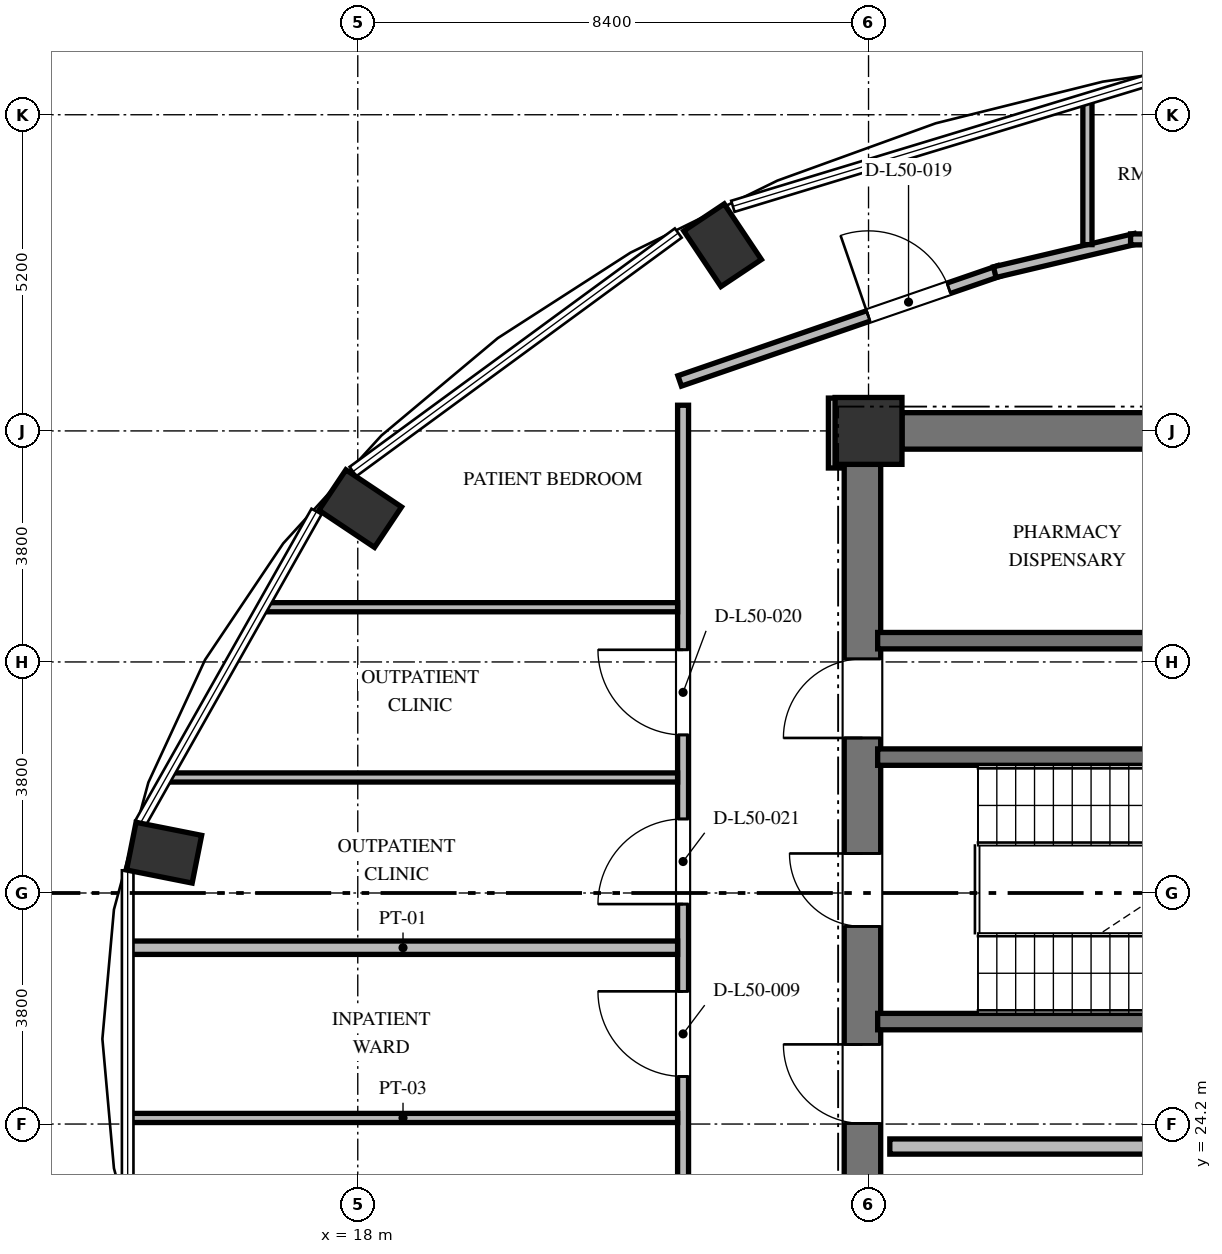
"""IFC4 building model, lengths in metres.
Left out: names, types, materials, properties, quantities, classifications, styles, units other than length and angle.
Written with IfcOpenShell. Run it as: python <this file> out.ifc"""

import sys

from ifc_helpers import new_model, si_unit, direction, frame, frame_2d, origin, origin_2d, place, context, subcontext, project, spatial, rectangle, extrude, element, fill, save


model = new_model("IFC4")
c1 = context("Model", 3, precision=1e-05, world=origin(), true_north=direction((0.0, 1.0)))
c2 = subcontext(c1, "Body", "Model", "MODEL_VIEW")
j1 = project(units=[si_unit("LENGTHUNIT", "METRE"), si_unit("PLANEANGLEUNIT", "RADIAN")], contexts=[c1])
p1 = place(None, origin())
s1 = spatial("IfcSite", under=j1, at=p1, CompositionType="ELEMENT")
p2 = place(p1, origin())
s2 = spatial("IfcBuilding", under=s1, at=p2, CompositionType="ELEMENT")
p3 = place(p2, frame((0.0, 0.0, 194.832)))
s3 = spatial("IfcBuildingStorey", under=s2, at=p3, CompositionType="ELEMENT", Elevation=194.832)
for number, where, z_axis, x_axis in (
    (1, (24.0, 38.654, 0.0), (0.0, 0.0, 1.0), (-0.556, 0.831, 0.0)),
    (2, (18.04, 34.323, 0.0), (0.0, 0.0, 1.0), (-0.831, 0.556, 0.0)),
    (3, (14.815, 28.663, 0.0), (0.0, 0.0, 1.0), (-0.981, 0.195, 0.0)),
):
    element("IfcColumn", number, at=place(p3, frame(where, z_axis=z_axis, x_axis=x_axis)), inside=s3, PredefinedType="COLUMN", context=c2, shape_type="SweptSolid", body=[
        extrude(rectangle(XDim=1.1, YDim=0.8, at=origin_2d()), origin(), (0.0, 0.0, 1.0), 3.648),
    ])
p4 = place(p3, frame((26.4, 35.6, 0.0), z_axis=(0.0, 0.0, 1.0), x_axis=(1.0, 0.0, 0.0)))
e4 = element("IfcColumn", 4, at=p4, inside=s3, PredefinedType="COLUMN", context=c2, shape_type="SweptSolid", body=[
    extrude(rectangle(XDim=1.1, YDim=1.1, at=origin_2d()), origin(), (0.0, 0.0, 1.0), 3.648),
])
p5 = place(p3, frame((26.3, 20.95, 0.0), z_axis=(0.0, 0.0, 1.0), x_axis=(0.0, 1.0, 0.0)))
e5 = element("IfcWall", 5, at=p5, inside=s3, PredefinedType="SHEAR", context=c2, shape_type="SweptSolid", body=[
    extrude(rectangle(XDim=14.1, YDim=0.6, at=frame_2d((7.05, 0.0))), origin(), (0.0, 0.0, 1.0), 3.648),
])
p6 = place(p5, frame((6.5, 0.0, 0.0)))
e6 = element("IfcOpeningElement", 6, at=p6, cuts=e5, PredefinedType="OPENING", context=c2, shape_type="SweptSolid", body=[
    extrude(rectangle(XDim=1.2, YDim=2.15, at=frame_2d((0.6, 1.075))), frame((0.0, 0.31, 0.0), z_axis=(0.0, -1.0, 0.0), x_axis=(1.0, 0.0, 0.0)), (0.0, 0.0, 1.0), 0.62),
])
p7 = place(p5, frame((9.6, 0.0, 0.0)))
e7 = element("IfcOpeningElement", 7, at=p7, cuts=e5, PredefinedType="OPENING", context=c2, shape_type="SweptSolid", body=[
    extrude(rectangle(XDim=1.3, YDim=2.2, at=frame_2d((0.65, 1.1))), frame((0.0, 0.31, 0.0), z_axis=(0.0, -1.0, 0.0), x_axis=(1.0, 0.0, 0.0)), (0.0, 0.0, 1.0), 0.62),
])
p8 = place(p5, frame((3.26, 0.0, 0.0)))
e8 = element("IfcOpeningElement", 8, at=p8, cuts=e5, PredefinedType="OPENING", context=c2, shape_type="SweptSolid", body=[
    extrude(rectangle(XDim=1.3, YDim=2.2, at=frame_2d((0.65, 1.1))), frame((0.0, 0.31, 0.0), z_axis=(0.0, -1.0, 0.0), x_axis=(1.0, 0.0, 0.0)), (0.0, 0.0, 1.0), 0.62),
])
p9 = place(p3, frame((26.95, 35.6, 0.0), z_axis=(0.0, 0.0, 1.0), x_axis=(1.0, 0.0, 0.0)))
e9 = element("IfcWall", 9, at=p9, inside=s3, PredefinedType="SHEAR", context=c2, shape_type="SweptSolid", body=[
    extrude(rectangle(XDim=5.45, YDim=0.6, at=frame_2d((2.725, 0.0))), origin(), (0.0, 0.0, 1.0), 3.648),
])
for number, where, z_axis, x_axis in (
    (10, (26.55, 30.235, 0.0), (0.0, 0.0, 1.0), (1.0, 0.0, 0.0)),
    (11, (26.55, 25.885, 0.0), (0.0, 0.0, 1.0), (1.0, 0.0, 0.0)),
):
    element("IfcWall", number, at=place(p3, frame(where, z_axis=z_axis, x_axis=x_axis)), inside=s3, PredefinedType="SHEAR", context=c2, shape_type="SweptSolid", body=[
        extrude(rectangle(XDim=7.985, YDim=0.27, at=frame_2d((3.992, 0.0))), origin(), (0.0, 0.0, 1.0), 3.648),
    ])
p10 = place(p3, frame((26.55, 32.15, 0.0), z_axis=(0.0, 0.0, 1.0), x_axis=(1.0, 0.0, 0.0)))
e12 = element("IfcWall", 12, at=p10, inside=s3, PredefinedType="SHEAR", context=c2, shape_type="SweptSolid", body=[
    extrude(rectangle(XDim=16.4, YDim=0.27, at=frame_2d((8.2, 0.0))), origin(), (0.0, 0.0, 1.0), 3.648),
])
p11 = place(p10, frame((5.125, 0.0, 0.0)))
e13 = element("IfcOpeningElement", 13, at=p11, cuts=e12, PredefinedType="OPENING", context=c2, shape_type="SweptSolid", body=[
    extrude(rectangle(XDim=1.05, YDim=2.15, at=frame_2d((0.525, 1.075))), frame((0.0, 0.145, 0.0), z_axis=(0.0, -1.0, 0.0), x_axis=(1.0, 0.0, 0.0)), (0.0, 0.0, 1.0), 0.29),
])
p12 = place(p10, frame((11.9, 0.0, 0.0)))
e14 = element("IfcOpeningElement", 14, at=p12, cuts=e12, PredefinedType="OPENING", context=c2, shape_type="SweptSolid", body=[
    extrude(rectangle(XDim=1.1, YDim=2.2, at=frame_2d((0.55, 1.1))), frame((0.0, 0.145, 0.0), z_axis=(0.0, -1.0, 0.0), x_axis=(1.0, 0.0, 0.0)), (0.0, 0.0, 1.0), 0.29),
])
p13 = place(p10, frame((14.5, 0.0, 0.0)))
e15 = element("IfcOpeningElement", 15, at=p13, cuts=e12, PredefinedType="OPENING", context=c2, shape_type="SweptSolid", body=[
    extrude(rectangle(XDim=1.1, YDim=2.2, at=frame_2d((0.55, 1.1))), frame((0.0, 0.145, 0.0), z_axis=(0.0, -1.0, 0.0), x_axis=(1.0, 0.0, 0.0)), (0.0, 0.0, 1.0), 0.29),
])
p14 = place(p3, frame((26.75, 23.83, 0.0), z_axis=(0.0, 0.0, 1.0), x_axis=(1.0, 0.0, 0.0)))
e16 = element("IfcWall", 16, at=p14, inside=s3, PredefinedType="SOLIDWALL", context=c2, shape_type="SweptSolid", body=[
    extrude(rectangle(XDim=16.2, YDim=0.25, at=frame_2d((8.1, 0.0))), origin(), (0.0, 0.0, 1.0), 3.448),
])
p15 = place(p14, frame((4.75, 0.0, 0.0)))
e17 = element("IfcOpeningElement", 17, at=p15, cuts=e16, PredefinedType="OPENING", context=c2, shape_type="SweptSolid", body=[
    extrude(rectangle(XDim=1.4, YDim=2.2, at=frame_2d((0.7, 1.1))), frame((0.0, 0.135, 0.0), z_axis=(0.0, -1.0, 0.0), x_axis=(1.0, 0.0, 0.0)), (0.0, 0.0, 1.0), 0.27),
])
p16 = place(p14, frame((11.7, 0.0, 0.0)))
e18 = element("IfcOpeningElement", 18, at=p16, cuts=e16, PredefinedType="OPENING", context=c2, shape_type="SweptSolid", body=[
    extrude(rectangle(XDim=1.1, YDim=2.2, at=frame_2d((0.55, 1.1))), frame((0.0, 0.135, 0.0), z_axis=(0.0, -1.0, 0.0), x_axis=(1.0, 0.0, 0.0)), (0.0, 0.0, 1.0), 0.27),
])
p17 = place(p14, frame((14.15, 0.0, 0.0)))
e19 = element("IfcOpeningElement", 19, at=p17, cuts=e16, PredefinedType="OPENING", context=c2, shape_type="SweptSolid", body=[
    extrude(rectangle(XDim=1.4, YDim=2.3, at=frame_2d((0.7, 1.15))), frame((0.0, 0.135, 0.0), z_axis=(0.0, -1.0, 0.0), x_axis=(1.0, 0.0, 0.0)), (0.0, 0.0, 1.0), 0.27),
])
p18 = place(p3, frame((23.294, 36.422, 0.0), z_axis=(0.0, 0.0, 1.0), x_axis=(0.945493277461, 0.325641616316, 0.0)))
e20 = element("IfcWall", 20, at=p18, inside=s3, PredefinedType="PARTITIONING", context=c2, shape_type="SweptSolid", body=[
    extrude(rectangle(XDim=5.562, YDim=0.18, at=frame_2d((2.781, 0.0))), origin(), (0.0, 0.0, 1.0), 3.073),
])
p19 = place(p18, frame((3.281, 0.0, 0.0)))
e21 = element("IfcOpeningElement", 21, at=p19, cuts=e20, PredefinedType="OPENING", context=c2, shape_type="SweptSolid", body=[
    extrude(rectangle(XDim=1.4, YDim=2.2, at=frame_2d((0.7, 1.1))), frame((0.0, 0.1, 0.0), z_axis=(0.0, -1.0, 0.0), x_axis=(1.0, 0.0, 0.0)), (0.0, 0.0, 1.0), 0.2),
])
p20 = place(p3, frame((28.476, 38.211, 0.0), z_axis=(0.0, 0.0, 1.0), x_axis=(0.973030562203, 0.230676234189, 0.0)))
e22 = element("IfcWall", 22, at=p20, inside=s3, PredefinedType="PARTITIONING", context=c2, shape_type="SweptSolid", body=[
    extrude(rectangle(XDim=2.377, YDim=0.18, at=frame_2d((1.188, 0.0))), origin(), (0.0, 0.0, 1.0), 3.448),
])
p21 = place(p3, frame((30.71, 38.75, 0.0), z_axis=(0.0, 0.0, 1.0), x_axis=(1.0, 0.0, 0.0)))
e23 = element("IfcWall", 23, at=p21, inside=s3, PredefinedType="PARTITIONING", context=c2, shape_type="SweptSolid", body=[
    extrude(rectangle(XDim=20.815, YDim=0.18, at=frame_2d((10.408, 0.0))), origin(), (0.0, 0.0, 1.0), 3.073),
])
p22 = place(p21, frame((17.194, 0.0, 0.0)))
e24 = element("IfcOpeningElement", 24, at=p22, cuts=e23, PredefinedType="OPENING", context=c2, shape_type="SweptSolid", body=[
    extrude(rectangle(XDim=1.4, YDim=2.2, at=frame_2d((0.7, 1.1))), frame((0.0, 0.1, 0.0), z_axis=(0.0, -1.0, 0.0), x_axis=(1.0, 0.0, 0.0)), (0.0, 0.0, 1.0), 0.2),
])
p23 = place(p21, frame((12.59, 0.0, 0.0)))
e25 = element("IfcOpeningElement", 25, at=p23, cuts=e23, PredefinedType="OPENING", context=c2, shape_type="SweptSolid", body=[
    extrude(rectangle(XDim=1.4, YDim=2.2, at=frame_2d((0.7, 1.1))), frame((0.0, 0.1, 0.0), z_axis=(0.0, -1.0, 0.0), x_axis=(1.0, 0.0, 0.0)), (0.0, 0.0, 1.0), 0.2),
])
p24 = place(p21, frame((8.59, 0.0, 0.0)))
e26 = element("IfcOpeningElement", 26, at=p24, cuts=e23, PredefinedType="OPENING", context=c2, shape_type="SweptSolid", body=[
    extrude(rectangle(XDim=1.4, YDim=2.2, at=frame_2d((0.7, 1.1))), frame((0.0, 0.1, 0.0), z_axis=(0.0, -1.0, 0.0), x_axis=(1.0, 0.0, 0.0)), (0.0, 0.0, 1.0), 0.2),
])
p25 = place(p21, frame((4.59, 0.0, 0.0)))
e27 = element("IfcOpeningElement", 27, at=p25, cuts=e23, PredefinedType="OPENING", context=c2, shape_type="SweptSolid", body=[
    extrude(rectangle(XDim=1.4, YDim=2.2, at=frame_2d((0.7, 1.1))), frame((0.0, 0.1, 0.0), z_axis=(0.0, -1.0, 0.0), x_axis=(1.0, 0.0, 0.0)), (0.0, 0.0, 1.0), 0.2),
])
p26 = place(p21, frame((1.104, 0.0, 0.0)))
e28 = element("IfcOpeningElement", 28, at=p26, cuts=e23, PredefinedType="OPENING", context=c2, shape_type="SweptSolid", body=[
    extrude(rectangle(XDim=1.4, YDim=2.2, at=frame_2d((0.7, 1.1))), frame((0.0, 0.1, 0.0), z_axis=(0.0, -1.0, 0.0), x_axis=(1.0, 0.0, 0.0)), (0.0, 0.0, 1.0), 0.2),
])
p27 = place(p3, frame((25.83, 36.14, 0.0), z_axis=(0.0, 0.0, 1.0), x_axis=(0.0, -1.0, 0.0)))
e29 = element("IfcWall", 29, at=p27, inside=s3, PredefinedType="PARTITIONING", context=c2, shape_type="SweptSolid", body=[
    extrude(rectangle(XDim=1.15, YDim=0.18, at=frame_2d((0.575, 0.0))), origin(), (0.0, 0.0, 1.0), 3.448),
])
p28 = place(p3, frame((23.35, 19.98, 0.0), z_axis=(0.0, 0.0, 1.0), x_axis=(0.0, 1.0, 0.0)))
e30 = element("IfcWall", 30, at=p28, inside=s3, PredefinedType="PARTITIONING", context=c2, shape_type="SweptSolid", body=[
    extrude(rectangle(XDim=16.042, YDim=0.18, at=frame_2d((8.021, 0.0))), origin(), (0.0, 0.0, 1.0), 3.448),
])
p29 = place(p28, frame((5.002, 0.0, 0.0)))
e31 = element("IfcOpeningElement", 31, at=p29, cuts=e30, PredefinedType="OPENING", context=c2, shape_type="SweptSolid", body=[
    extrude(rectangle(XDim=1.4, YDim=2.2, at=frame_2d((0.7, 1.1))), frame((0.0, 0.1, 0.0), z_axis=(0.0, -1.0, 0.0), x_axis=(1.0, 0.0, 0.0)), (0.0, 0.0, 1.0), 0.2),
])
p30 = place(p28, frame((1.794, 0.0, 0.0)))
e32 = element("IfcOpeningElement", 32, at=p30, cuts=e30, PredefinedType="OPENING", context=c2, shape_type="SweptSolid", body=[
    extrude(rectangle(XDim=1.05, YDim=2.15, at=frame_2d((0.525, 1.075))), frame((0.0, 0.1, 0.0), z_axis=(0.0, -1.0, 0.0), x_axis=(1.0, 0.0, 0.0)), (0.0, 0.0, 1.0), 0.2),
])
p31 = place(p28, frame((10.62, 0.0, 0.0)))
e33 = element("IfcOpeningElement", 33, at=p31, cuts=e30, PredefinedType="OPENING", context=c2, shape_type="SweptSolid", body=[
    extrude(rectangle(XDim=1.4, YDim=2.2, at=frame_2d((0.7, 1.1))), frame((0.0, 0.1, 0.0), z_axis=(0.0, -1.0, 0.0), x_axis=(1.0, 0.0, 0.0)), (0.0, 0.0, 1.0), 0.2),
])
p32 = place(p28, frame((7.837, 0.0, 0.0)))
e34 = element("IfcOpeningElement", 34, at=p32, cuts=e30, PredefinedType="OPENING", context=c2, shape_type="SweptSolid", body=[
    extrude(rectangle(XDim=1.4, YDim=2.2, at=frame_2d((0.7, 1.1))), frame((0.0, 0.1, 0.0), z_axis=(0.0, -1.0, 0.0), x_axis=(1.0, 0.0, 0.0)), (0.0, 0.0, 1.0), 0.2),
])
p33 = place(p3, frame((14.228, 24.3, 0.0), z_axis=(0.0, 0.0, 1.0), x_axis=(1.0, 0.0, 0.0)))
e35 = element("IfcWall", 35, at=p33, inside=s3, PredefinedType="PARTITIONING", context=c2, shape_type="SweptSolid", body=[
    extrude(rectangle(XDim=9.032, YDim=0.15, at=frame_2d((4.516, 0.0))), origin(), (0.0, 0.0, 1.0), 3.448),
])
p34 = place(p3, frame((14.228, 27.1, 0.0), z_axis=(0.0, 0.0, 1.0), x_axis=(1.0, 0.0, 0.0)))
e36 = element("IfcWall", 36, at=p34, inside=s3, PredefinedType="PARTITIONING", context=c2, shape_type="SweptSolid", body=[
    extrude(rectangle(XDim=9.032, YDim=0.22, at=frame_2d((4.516, 0.0))), origin(), (0.0, 0.0, 1.0), 3.448),
])
p35 = place(p3, frame((14.861, 29.9, 0.0), z_axis=(0.0, 0.0, 1.0), x_axis=(1.0, 0.0, 0.0)))
e37 = element("IfcWall", 37, at=p35, inside=s3, PredefinedType="PARTITIONING", context=c2, shape_type="SweptSolid", body=[
    extrude(rectangle(XDim=8.399, YDim=0.15, at=frame_2d((4.2, 0.0))), origin(), (0.0, 0.0, 1.0), 3.448),
])
p36 = place(p3, frame((16.443, 32.7, 0.0), z_axis=(0.0, 0.0, 1.0), x_axis=(1.0, 0.0, 0.0)))
e38 = element("IfcWall", 38, at=p36, inside=s3, PredefinedType="PARTITIONING", context=c2, shape_type="SweptSolid", body=[
    extrude(rectangle(XDim=6.817, YDim=0.15, at=frame_2d((3.409, 0.0))), origin(), (0.0, 0.0, 1.0), 3.448),
])
p37 = place(p3, frame((30.0, 38.664, 0.0), z_axis=(0.0, 0.0, 1.0), x_axis=(0.0, 1.0, 0.0)))
e39 = element("IfcWall", 39, at=p37, inside=s3, PredefinedType="PARTITIONING", context=c2, shape_type="SweptSolid", body=[
    extrude(rectangle(XDim=2.384, YDim=0.15, at=frame_2d((1.192, 0.0))), origin(), (0.0, 0.0, 1.0), 3.448),
])
p38 = place(p6, origin())
e40 = element("IfcDoor", 40, at=p38, inside=s3, OperationType="SINGLE_SWING_RIGHT", PredefinedType="DOOR", context=c2, shape_type="SweptSolid", body=[
    extrude(rectangle(XDim=1.2, YDim=2.15, at=frame_2d((0.6, 1.075))), frame((0.0, 0.025, 0.0), z_axis=(0.0, -1.0, 0.0), x_axis=(1.0, 0.0, 0.0)), (0.0, 0.0, 1.0), 0.05),
])
fill(e6, e40)
p39 = place(p7, origin())
e41 = element("IfcDoor", 41, at=p39, inside=s3, OperationType="SINGLE_SWING_LEFT", PredefinedType="DOOR", context=c2, shape_type="SweptSolid", body=[
    extrude(rectangle(XDim=1.3, YDim=2.2, at=frame_2d((0.65, 1.1))), frame((0.0, 0.025, 0.0), z_axis=(0.0, -1.0, 0.0), x_axis=(1.0, 0.0, 0.0)), (0.0, 0.0, 1.0), 0.05),
])
fill(e7, e41)
p40 = place(p8, origin())
e42 = element("IfcDoor", 42, at=p40, inside=s3, OperationType="SINGLE_SWING_RIGHT", PredefinedType="DOOR", context=c2, shape_type="SweptSolid", body=[
    extrude(rectangle(XDim=1.3, YDim=2.2, at=frame_2d((0.65, 1.1))), frame((0.0, 0.025, 0.0), z_axis=(0.0, -1.0, 0.0), x_axis=(1.0, 0.0, 0.0)), (0.0, 0.0, 1.0), 0.05),
])
fill(e8, e42)
p41 = place(p29, origin())
e43 = element("IfcDoor", 43, at=p41, inside=s3, OperationType="SINGLE_SWING_RIGHT", PredefinedType="DOOR", context=c2, shape_type="SweptSolid", body=[
    extrude(rectangle(XDim=1.4, YDim=2.2, at=frame_2d((0.7, 1.1))), frame((0.0, 0.025, 0.0), z_axis=(0.0, -1.0, 0.0), x_axis=(1.0, 0.0, 0.0)), (0.0, 0.0, 1.0), 0.05),
])
fill(e31, e43)
p42 = place(p19, origin())
e44 = element("IfcDoor", 44, at=p42, inside=s3, OperationType="SINGLE_SWING_LEFT", PredefinedType="DOOR", context=c2, shape_type="SweptSolid", body=[
    extrude(rectangle(XDim=1.4, YDim=2.2, at=frame_2d((0.7, 1.1))), frame((0.0, 0.025, 0.0), z_axis=(0.0, -1.0, 0.0), x_axis=(1.0, 0.0, 0.0)), (0.0, 0.0, 1.0), 0.05),
])
fill(e21, e44)
p43 = place(p31, origin())
e45 = element("IfcDoor", 45, at=p43, inside=s3, OperationType="SINGLE_SWING_RIGHT", PredefinedType="DOOR", context=c2, shape_type="SweptSolid", body=[
    extrude(rectangle(XDim=1.4, YDim=2.2, at=frame_2d((0.7, 1.1))), frame((0.0, 0.025, 0.0), z_axis=(0.0, -1.0, 0.0), x_axis=(1.0, 0.0, 0.0)), (0.0, 0.0, 1.0), 0.05),
])
fill(e33, e45)
p44 = place(p32, origin())
e46 = element("IfcDoor", 46, at=p44, inside=s3, OperationType="SINGLE_SWING_LEFT", PredefinedType="DOOR", context=c2, shape_type="SweptSolid", body=[
    extrude(rectangle(XDim=1.4, YDim=2.2, at=frame_2d((0.7, 1.1))), frame((0.0, 0.025, 0.0), z_axis=(0.0, -1.0, 0.0), x_axis=(1.0, 0.0, 0.0)), (0.0, 0.0, 1.0), 0.05),
])
fill(e34, e46)
save(model, sys.argv[1])
